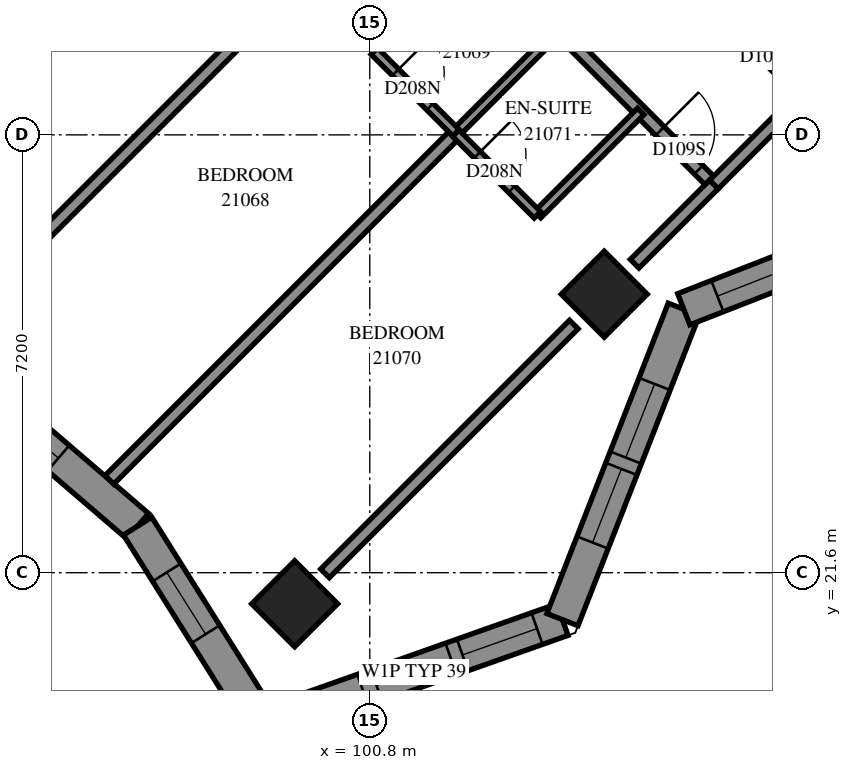
"""IFC4 building model, lengths in metres.
Left out: names, types, materials, properties, quantities, classifications, styles, units other than length and angle.
Written with IfcOpenShell. Run it as: python <this file> out.ifc"""

import sys

from ifc_helpers import new_model, si_unit, direction, frame, frame_2d, origin, origin_2d, place, context, subcontext, project, spatial, polyline, rectangle, outline, extrude, element, fill, save


model = new_model("IFC4")
c1 = context("Model", 3, precision=1e-05, world=origin(), true_north=direction((0.0, 1.0)))
c2 = subcontext(c1, "Body", "Model", "MODEL_VIEW")
j1 = project(units=[si_unit("LENGTHUNIT", "METRE"), si_unit("PLANEANGLEUNIT", "RADIAN")], contexts=[c1])
p1 = place(None, origin())
s1 = spatial("IfcSite", under=j1, at=p1, CompositionType="ELEMENT")
p2 = place(p1, origin())
s2 = spatial("IfcBuilding", under=s1, at=p2, CompositionType="ELEMENT")
p3 = place(p2, frame((0.0, 0.0, 81.2)))
s3 = spatial("IfcBuildingStorey", under=s2, at=p3, CompositionType="ELEMENT", Elevation=81.2)
for number, where, z_axis, x_axis in (
    (1, (104.656, 26.18, 0.0), (0.0, 0.0, 1.0), (0.707, -0.707, 0.0)),
    (2, (99.565, 21.088, 0.0), (0.0, 0.0, 1.0), (0.707, -0.707, 0.0)),
):
    element("IfcColumn", number, at=place(p3, frame(where, z_axis=z_axis, x_axis=x_axis)), inside=s3, PredefinedType="COLUMN", context=c2, shape_type="SweptSolid", body=[
        extrude(rectangle(XDim=1.0, YDim=1.0, at=origin_2d()), origin(), (0.0, 0.0, 1.0), 3.1),
    ])
p4 = place(p3, frame((99.044, 19.087, 0.0), z_axis=(0.0, 0.0, 1.0), x_axis=(0.9428152367, 0.3333158105, 0.0)))
e3 = element("IfcWall", 3, at=p4, inside=s3, PredefinedType="SOLIDWALL", context=c2, shape_type="SweptSolid", body=[
    extrude(outline(polyline([(-0.22, -0.275), (5.349, -0.275), (5.097, 0.275), (0.22, 0.275), (-0.22, -0.275)])), origin(), (0.0, 0.0, 1.0), 3.1),
])
p5 = place(p4, frame((1.98, 0.0, 0.5)))
e4 = element("IfcOpeningElement", 4, at=p5, cuts=e3, PredefinedType="OPENING", context=c2, shape_type="SweptSolid", body=[
    extrude(rectangle(XDim=1.3, YDim=2.45, at=frame_2d((0.65, 1.225))), frame((0.0, 0.285, 0.0), z_axis=(0.0, -1.0, 0.0), x_axis=(1.0, 0.0, 0.0)), (0.0, 0.0, 1.0), 0.57),
])
p6 = place(p4, frame((3.48, 0.0, 0.5)))
e5 = element("IfcOpeningElement", 5, at=p6, cuts=e3, PredefinedType="OPENING", context=c2, shape_type="SweptSolid", body=[
    extrude(rectangle(XDim=1.3, YDim=2.45, at=frame_2d((0.65, 1.225))), frame((0.0, 0.285, 0.0), z_axis=(0.0, -1.0, 0.0), x_axis=(1.0, 0.0, 0.0)), (0.0, 0.0, 1.0), 0.57),
])
p7 = place(p4, frame((0.541, 0.0, 0.5)))
e6 = element("IfcOpeningElement", 6, at=p7, cuts=e3, PredefinedType="OPENING", context=c2, shape_type="SweptSolid", body=[
    extrude(rectangle(XDim=1.2, YDim=2.45, at=frame_2d((0.6, 1.225))), frame((0.0, 0.285, 0.0), z_axis=(0.0, -1.0, 0.0), x_axis=(1.0, 0.0, 0.0)), (0.0, 0.0, 1.0), 0.57),
])
p8 = place(p3, frame((103.968, 20.828, 0.0), z_axis=(0.0, 0.0, 1.0), x_axis=(0.3641399428, 0.9313442446, 0.0)))
e7 = element("IfcWall", 7, at=p8, inside=s3, PredefinedType="SOLIDWALL", context=c2, shape_type="SweptSolid", body=[
    extrude(outline(polyline([(-0.126, -0.275), (5.36, -0.275), (5.6, 0.275), (0.126, 0.275), (-0.126, -0.275)])), origin(), (0.0, 0.0, 1.0), 3.1),
])
p9 = place(p8, frame((1.361, 0.0, 0.5)))
e8 = element("IfcOpeningElement", 8, at=p9, cuts=e7, PredefinedType="OPENING", context=c2, shape_type="SweptSolid", body=[
    extrude(rectangle(XDim=1.3, YDim=2.45, at=frame_2d((0.65, 1.225))), frame((0.0, 0.285, 0.0), z_axis=(0.0, -1.0, 0.0), x_axis=(1.0, 0.0, 0.0)), (0.0, 0.0, 1.0), 0.57),
])
p10 = place(p8, frame((2.861, 0.0, 0.5)))
e9 = element("IfcOpeningElement", 9, at=p10, cuts=e7, PredefinedType="OPENING", context=c2, shape_type="SweptSolid", body=[
    extrude(rectangle(XDim=1.3, YDim=2.45, at=frame_2d((0.65, 1.225))), frame((0.0, 0.285, 0.0), z_axis=(0.0, -1.0, 0.0), x_axis=(1.0, 0.0, 0.0)), (0.0, 0.0, 1.0), 0.57),
])
p11 = place(p3, frame((105.964, 25.932, 0.0), z_axis=(0.0, 0.0, 1.0), x_axis=(0.9313442446, 0.3641399428, 0.0)))
e10 = element("IfcWall", 10, at=p11, inside=s3, PredefinedType="SOLIDWALL", context=c2, shape_type="SweptSolid", body=[
    extrude(outline(polyline([(0.12, -0.275), (5.606, -0.275), (5.354, 0.275), (-0.12, 0.275), (0.12, -0.275)])), origin(), (0.0, 0.0, 1.0), 3.1),
])
p12 = place(p11, frame((0.593, 0.0, 0.5)))
e11 = element("IfcOpeningElement", 11, at=p12, cuts=e10, PredefinedType="OPENING", context=c2, shape_type="SweptSolid", body=[
    extrude(rectangle(XDim=1.2, YDim=2.45, at=frame_2d((0.6, 1.225))), frame((0.0, 0.285, 0.0), z_axis=(0.0, -1.0, 0.0), x_axis=(1.0, 0.0, 0.0)), (0.0, 0.0, 1.0), 0.57),
])
p13 = place(p11, frame((3.07, 0.0, 0.5)))
e12 = element("IfcOpeningElement", 12, at=p13, cuts=e10, PredefinedType="OPENING", context=c2, shape_type="SweptSolid", body=[
    extrude(rectangle(XDim=1.2, YDim=2.45, at=frame_2d((0.6, 1.225))), frame((0.0, 0.285, 0.0), z_axis=(0.0, -1.0, 0.0), x_axis=(1.0, 0.0, 0.0)), (0.0, 0.0, 1.0), 0.57),
])
p14 = place(p3, frame((93.961, 24.96, 0.0), z_axis=(0.0, 0.0, 1.0), x_axis=(0.7586163158, -0.6515376316, 0.0)))
e13 = element("IfcWall", 13, at=p14, inside=s3, PredefinedType="SOLIDWALL", context=c2, shape_type="SweptSolid", body=[
    extrude(outline(polyline([(-0.021, -0.275), (3.941, -0.275), (4.024, 0.275), (0.021, 0.275), (-0.021, -0.275)])), origin(), (0.0, 0.0, 1.0), 3.1),
])
p15 = place(p14, frame((1.065, 0.0, 0.5)))
e14 = element("IfcOpeningElement", 14, at=p15, cuts=e13, PredefinedType="OPENING", context=c2, shape_type="SweptSolid", body=[
    extrude(rectangle(XDim=1.2, YDim=2.45, at=frame_2d((0.6, 1.225))), frame((0.0, 0.285, 0.0), z_axis=(0.0, -1.0, 0.0), x_axis=(1.0, 0.0, 0.0)), (0.0, 0.0, 1.0), 0.57),
])
p16 = place(p3, frame((96.982, 22.366, 0.0), z_axis=(0.0, 0.0, 1.0), x_axis=(0.5323618976, -0.8465168693, 0.0)))
e15 = element("IfcWall", 15, at=p16, inside=s3, PredefinedType="SOLIDWALL", context=c2, shape_type="SweptSolid", body=[
    extrude(outline(polyline([(0.042, -0.275), (4.093, -0.275), (3.653, 0.275), (-0.042, 0.275), (0.042, -0.275)])), origin(), (0.0, 0.0, 1.0), 3.1),
])
p17 = place(p16, frame((0.9, 0.0, 0.5)))
e16 = element("IfcOpeningElement", 16, at=p17, cuts=e15, PredefinedType="OPENING", context=c2, shape_type="SweptSolid", body=[
    extrude(rectangle(XDim=1.2, YDim=2.45, at=frame_2d((0.6, 1.225))), frame((0.0, 0.285, 0.0), z_axis=(0.0, -1.0, 0.0), x_axis=(1.0, 0.0, 0.0)), (0.0, 0.0, 1.0), 0.57),
])
p18 = place(p3, frame((96.518, 23.127, 0.0), z_axis=(0.0, 0.0, 1.0), x_axis=(0.7069765458, 0.7072369926, 0.0)))
e17 = element("IfcWall", 17, at=p18, inside=s3, PredefinedType="PARTITIONING", context=c2, shape_type="SweptSolid", body=[
    extrude(rectangle(XDim=8.063, YDim=0.2, at=frame_2d((4.032, 0.0))), origin(), (0.0, 0.0, 1.0), 3.1),
])
p19 = place(p3, frame((101.365, 33.071, 0.0), z_axis=(0.0, 0.0, 1.0), x_axis=(0.7071067812, -0.7071067812, 0.0)))
e18 = element("IfcWall", 18, at=p19, inside=s3, PredefinedType="PARTITIONING", context=c2, shape_type="SweptSolid", body=[
    extrude(rectangle(XDim=7.2, YDim=0.2, at=frame_2d((3.6, 0.0))), origin(), (0.0, 0.0, 1.0), 3.1),
])
p20 = place(p19, frame((0.248, 0.0, 0.0)))
e19 = element("IfcOpeningElement", 19, at=p20, cuts=e18, PredefinedType="OPENING", context=c2, shape_type="SweptSolid", body=[
    extrude(rectangle(XDim=0.9, YDim=2.1, at=frame_2d((0.45, 1.05))), frame((0.0, 0.11, 0.0), z_axis=(0.0, -1.0, 0.0), x_axis=(1.0, 0.0, 0.0)), (0.0, 0.0, 1.0), 0.22),
])
p21 = place(p19, frame((5.95, 0.0, 0.0)))
e20 = element("IfcOpeningElement", 20, at=p21, cuts=e18, PredefinedType="OPENING", context=c2, shape_type="SweptSolid", body=[
    extrude(rectangle(XDim=0.9, YDim=2.1, at=frame_2d((0.45, 1.05))), frame((0.0, 0.11, 0.0), z_axis=(0.0, -1.0, 0.0), x_axis=(1.0, 0.0, 0.0)), (0.0, 0.0, 1.0), 0.22),
])
p22 = place(p3, frame((100.063, 21.589, 0.0), z_axis=(0.0, 0.0, 1.0), x_axis=(0.7071067812, 0.7071067812, 0.0)))
e21 = element("IfcWall", 21, at=p22, inside=s3, PredefinedType="PARTITIONING", context=c2, shape_type="SweptSolid", body=[
    extrude(rectangle(XDim=5.787, YDim=0.2, at=frame_2d((2.893, 0.0))), origin(), (0.0, 0.0, 1.0), 2.6),
])
p23 = place(p3, frame((94.973, 26.681, 0.0), z_axis=(0.0, 0.0, 1.0), x_axis=(0.7071067812, 0.7071067812, 0.0)))
e22 = element("IfcWall", 22, at=p23, inside=s3, PredefinedType="PARTITIONING", context=c2, shape_type="SweptSolid", body=[
    extrude(rectangle(XDim=5.784, YDim=0.2, at=frame_2d((2.892, 0.0))), origin(), (0.0, 0.0, 1.0), 3.1),
])
p24 = place(p3, frame((104.123, 33.282, 0.0), z_axis=(0.0, 0.0, 1.0), x_axis=(0.7071067812, -0.7071067812, 0.0)))
e23 = element("IfcWall", 23, at=p24, inside=s3, PredefinedType="PARTITIONING", context=c2, shape_type="SweptSolid", body=[
    extrude(rectangle(XDim=5.399, YDim=0.2, at=frame_2d((2.7, 0.0))), origin(), (0.0, 0.0, 1.0), 3.1),
])
p25 = place(p24, frame((4.08, 0.0, 0.0)))
e24 = element("IfcOpeningElement", 24, at=p25, cuts=e23, PredefinedType="OPENING", context=c2, shape_type="SweptSolid", body=[
    extrude(rectangle(XDim=0.9, YDim=2.1, at=frame_2d((0.45, 1.05))), frame((0.0, 0.11, 0.0), z_axis=(0.0, -1.0, 0.0), x_axis=(1.0, 0.0, 0.0)), (0.0, 0.0, 1.0), 0.22),
])
p26 = place(p3, frame((100.871, 30.175, 0.0), z_axis=(0.0, 0.0, 1.0), x_axis=(0.7071067812, 0.7071067812, 0.0)))
e25 = element("IfcWall", 25, at=p26, inside=s3, PredefinedType="PARTITIONING", context=c2, shape_type="SweptSolid", body=[
    extrude(rectangle(XDim=2.401, YDim=0.15, at=frame_2d((1.201, 0.0))), origin(), (0.0, 0.0, 1.0), 3.1),
])
for number, where, z_axis, x_axis in (
    (26, (102.216, 28.832, 0.0), (0.0, 0.0, 1.0), (0.707, 0.707, 0.0)),
    (27, (103.559, 27.489, 0.0), (0.0, 0.0, 1.0), (0.707, 0.707, 0.0)),
):
    element("IfcWall", number, at=place(p3, frame(where, z_axis=z_axis, x_axis=x_axis)), inside=s3, PredefinedType="PARTITIONING", context=c2, shape_type="SweptSolid", body=[
        extrude(rectangle(XDim=2.398, YDim=0.15, at=frame_2d((1.199, 0.0))), origin(), (0.0, 0.0, 1.0), 3.1),
    ])
p27 = place(p3, frame((106.457, 27.983, 0.0), z_axis=(0.0, 0.0, 1.0), x_axis=(0.7071067812, 0.7071067812, 0.0)))
e28 = element("IfcWall", 28, at=p27, inside=s3, PredefinedType="PARTITIONING", context=c2, shape_type="SweptSolid", body=[
    extrude(rectangle(XDim=2.102, YDim=0.2, at=frame_2d((1.051, 0.0))), origin(), (0.0, 0.0, 1.0), 2.6),
])
p28 = place(p3, frame((100.875, 30.177, 0.0), z_axis=(0.0, 0.0, 1.0), x_axis=(0.7076330979, -0.7065800724, 0.0)))
e29 = element("IfcWall", 29, at=p28, inside=s3, PredefinedType="PARTITIONING", context=c2, shape_type="SweptSolid", body=[
    extrude(rectangle(XDim=1.899, YDim=0.15, at=frame_2d((0.95, 0.0))), origin(), (0.0, 0.0, 1.0), 3.1),
])
p29 = place(p28, frame((0.493, 0.0, 0.0)))
e30 = element("IfcOpeningElement", 30, at=p29, cuts=e29, PredefinedType="OPENING", context=c2, shape_type="SweptSolid", body=[
    extrude(rectangle(XDim=0.8, YDim=2.1, at=frame_2d((0.4, 1.05))), frame((0.0, 0.085, 0.0), z_axis=(0.0, -1.0, 0.0), x_axis=(1.0, 0.0, 0.0)), (0.0, 0.0, 1.0), 0.17),
])
p30 = place(p3, frame((102.215, 28.826, 0.0), z_axis=(0.0, 0.0, 1.0), x_axis=(0.7071067812, -0.7071067812, 0.0)))
e31 = element("IfcWall", 31, at=p30, inside=s3, PredefinedType="PARTITIONING", context=c2, shape_type="SweptSolid", body=[
    extrude(rectangle(XDim=1.898, YDim=0.15, at=frame_2d((0.949, 0.0))), origin(), (0.0, 0.0, 1.0), 3.1),
])
p31 = place(p30, frame((0.5, 0.0, 0.0)))
e32 = element("IfcOpeningElement", 32, at=p31, cuts=e31, PredefinedType="OPENING", context=c2, shape_type="SweptSolid", body=[
    extrude(rectangle(XDim=0.8, YDim=2.1, at=frame_2d((0.4, 1.05))), frame((0.0, 0.085, 0.0), z_axis=(0.0, -1.0, 0.0), x_axis=(1.0, 0.0, 0.0)), (0.0, 0.0, 1.0), 0.17),
])
p32 = place(p3, frame((105.155, 26.681, 0.0), z_axis=(0.0, 0.0, 1.0), x_axis=(0.7071067812, 0.7071067812, 0.0)))
e33 = element("IfcWall", 33, at=p32, inside=s3, PredefinedType="PARTITIONING", context=c2, shape_type="SweptSolid", body=[
    extrude(rectangle(XDim=1.841, YDim=0.2, at=frame_2d((0.921, 0.0))), origin(), (0.0, 0.0, 1.0), 2.6),
])
p33 = place(p5, origin())
e34 = element("IfcWindow", 34, at=p33, inside=s3, PartitioningType="SINGLE_PANEL", PredefinedType="WINDOW", context=c2, shape_type="SweptSolid", body=[
    extrude(rectangle(XDim=1.3, YDim=2.45, at=frame_2d((0.65, 1.225))), frame((0.0, 0.155, 0.0), z_axis=(0.0, -1.0, 0.0), x_axis=(1.0, 0.0, 0.0)), (0.0, 0.0, 1.0), 0.06),
])
fill(e4, e34)
p34 = place(p6, origin())
e35 = element("IfcWindow", 35, at=p34, inside=s3, PartitioningType="SINGLE_PANEL", PredefinedType="WINDOW", context=c2, shape_type="SweptSolid", body=[
    extrude(rectangle(XDim=1.3, YDim=2.45, at=frame_2d((0.65, 1.225))), frame((0.0, 0.155, 0.0), z_axis=(0.0, -1.0, 0.0), x_axis=(1.0, 0.0, 0.0)), (0.0, 0.0, 1.0), 0.06),
])
fill(e5, e35)
p35 = place(p7, origin())
e36 = element("IfcWindow", 36, at=p35, inside=s3, PartitioningType="SINGLE_PANEL", PredefinedType="WINDOW", context=c2, shape_type="SweptSolid", body=[
    extrude(rectangle(XDim=1.2, YDim=2.45, at=frame_2d((0.6, 1.225))), frame((0.0, 0.155, 0.0), z_axis=(0.0, -1.0, 0.0), x_axis=(1.0, 0.0, 0.0)), (0.0, 0.0, 1.0), 0.06),
])
fill(e6, e36)
p36 = place(p9, origin())
e37 = element("IfcWindow", 37, at=p36, inside=s3, PartitioningType="SINGLE_PANEL", PredefinedType="WINDOW", context=c2, shape_type="SweptSolid", body=[
    extrude(rectangle(XDim=1.3, YDim=2.45, at=frame_2d((0.65, 1.225))), frame((0.0, 0.155, 0.0), z_axis=(0.0, -1.0, 0.0), x_axis=(1.0, 0.0, 0.0)), (0.0, 0.0, 1.0), 0.06),
])
fill(e8, e37)
p37 = place(p10, origin())
e38 = element("IfcWindow", 38, at=p37, inside=s3, PartitioningType="SINGLE_PANEL", PredefinedType="WINDOW", context=c2, shape_type="SweptSolid", body=[
    extrude(rectangle(XDim=1.3, YDim=2.45, at=frame_2d((0.65, 1.225))), frame((0.0, 0.155, 0.0), z_axis=(0.0, -1.0, 0.0), x_axis=(1.0, 0.0, 0.0)), (0.0, 0.0, 1.0), 0.06),
])
fill(e9, e38)
p38 = place(p12, origin())
e39 = element("IfcWindow", 39, at=p38, inside=s3, PartitioningType="SINGLE_PANEL", PredefinedType="WINDOW", context=c2, shape_type="SweptSolid", body=[
    extrude(rectangle(XDim=1.2, YDim=2.45, at=frame_2d((0.6, 1.225))), frame((0.0, 0.155, 0.0), z_axis=(0.0, -1.0, 0.0), x_axis=(1.0, 0.0, 0.0)), (0.0, 0.0, 1.0), 0.06),
])
fill(e11, e39)
p39 = place(p15, origin())
e40 = element("IfcWindow", 40, at=p39, inside=s3, PartitioningType="SINGLE_PANEL", PredefinedType="WINDOW", context=c2, shape_type="SweptSolid", body=[
    extrude(rectangle(XDim=1.2, YDim=2.45, at=frame_2d((0.6, 1.225))), frame((0.0, 0.155, 0.0), z_axis=(0.0, -1.0, 0.0), x_axis=(1.0, 0.0, 0.0)), (0.0, 0.0, 1.0), 0.06),
])
fill(e14, e40)
p40 = place(p17, origin())
e41 = element("IfcWindow", 41, at=p40, inside=s3, PartitioningType="SINGLE_PANEL", PredefinedType="WINDOW", context=c2, shape_type="SweptSolid", body=[
    extrude(rectangle(XDim=1.2, YDim=2.45, at=frame_2d((0.6, 1.225))), frame((0.0, 0.155, 0.0), z_axis=(0.0, -1.0, 0.0), x_axis=(1.0, 0.0, 0.0)), (0.0, 0.0, 1.0), 0.06),
])
fill(e16, e41)
p41 = place(p29, origin())
e42 = element("IfcDoor", 42, at=p41, inside=s3, OperationType="SINGLE_SWING_RIGHT", PredefinedType="DOOR", context=c2, shape_type="SweptSolid", body=[
    extrude(rectangle(XDim=0.8, YDim=2.1, at=frame_2d((0.4, 1.05))), frame((0.0, 0.025, 0.0), z_axis=(0.0, -1.0, 0.0), x_axis=(1.0, 0.0, 0.0)), (0.0, 0.0, 1.0), 0.05),
])
fill(e30, e42)
p42 = place(p21, origin())
e43 = element("IfcDoor", 43, at=p42, inside=s3, OperationType="SINGLE_SWING_LEFT", PredefinedType="DOOR", context=c2, shape_type="SweptSolid", body=[
    extrude(rectangle(XDim=0.9, YDim=2.1, at=frame_2d((0.45, 1.05))), frame((0.0, 0.025, 0.0), z_axis=(0.0, -1.0, 0.0), x_axis=(1.0, 0.0, 0.0)), (0.0, 0.0, 1.0), 0.05),
])
fill(e20, e43)
p43 = place(p31, origin())
e44 = element("IfcDoor", 44, at=p43, inside=s3, OperationType="SINGLE_SWING_RIGHT", PredefinedType="DOOR", context=c2, shape_type="SweptSolid", body=[
    extrude(rectangle(XDim=0.8, YDim=2.1, at=frame_2d((0.4, 1.05))), frame((0.0, 0.025, 0.0), z_axis=(0.0, -1.0, 0.0), x_axis=(1.0, 0.0, 0.0)), (0.0, 0.0, 1.0), 0.05),
])
fill(e32, e44)
p44 = place(p25, origin())
e45 = element("IfcDoor", 45, at=p44, inside=s3, OperationType="SINGLE_SWING_RIGHT", PredefinedType="DOOR", context=c2, shape_type="SweptSolid", body=[
    extrude(rectangle(XDim=0.9, YDim=2.1, at=frame_2d((0.45, 1.05))), frame((0.0, 0.025, 0.0), z_axis=(0.0, -1.0, 0.0), x_axis=(1.0, 0.0, 0.0)), (0.0, 0.0, 1.0), 0.05),
])
fill(e24, e45)
save(model, sys.argv[1])
